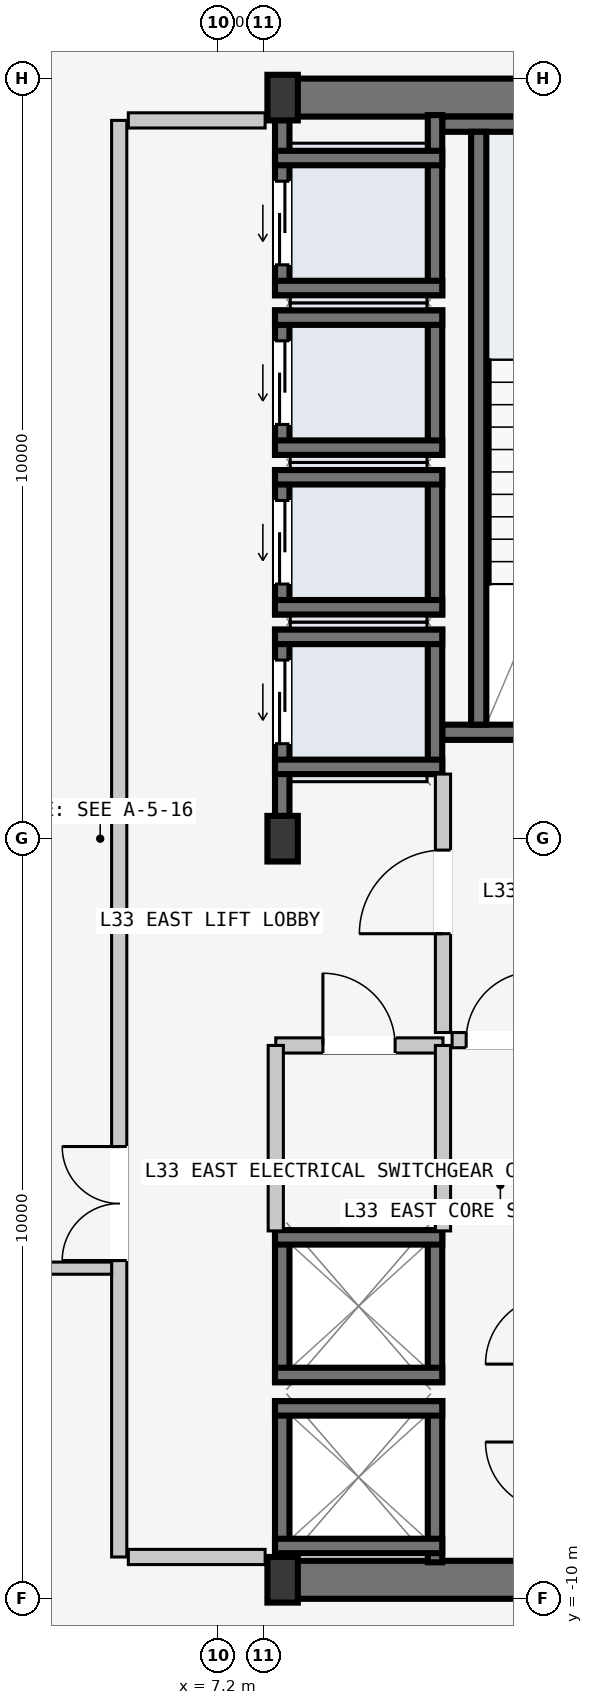
"""IFC4 building model, lengths in metres.
Left out: names, types, materials, properties, quantities, classifications, styles, units other than length and angle.
Written with IfcOpenShell. Run it as: python <this file> out.ifc"""

import sys

from ifc_helpers import new_model, si_unit, direction, frame, frame_2d, origin, origin_2d, place, context, subcontext, project, spatial, rectangle, i_section, extrude, element, fill, save


model = new_model("IFC4")
c1 = context("Model", 3, precision=1e-05, world=origin(), true_north=direction((0.0, 1.0)))
c2 = subcontext(c1, "Body", "Model", "MODEL_VIEW")
j1 = project(units=[si_unit("LENGTHUNIT", "METRE"), si_unit("PLANEANGLEUNIT", "RADIAN")], contexts=[c1])
p1 = place(None, origin())
s1 = spatial("IfcSite", under=j1, at=p1, CompositionType="ELEMENT")
p2 = place(p1, origin())
s2 = spatial("IfcBuilding", under=s1, at=p2, CompositionType="ELEMENT")
p3 = place(p2, frame((0.0, 0.0, 127.8)))
s3 = spatial("IfcBuildingStorey", under=s2, at=p3, CompositionType="ELEMENT", Elevation=127.8)
for number, where, z_axis, x_axis in (
    (1, (8.07, -9.75, -0.2), (0.0, 0.0, 1.0), (1.0, 0.0, 0.0)),
    (2, (8.07, 9.75, -0.2), (0.0, 0.0, 1.0), (1.0, 0.0, 0.0)),
):
    element("IfcWall", number, at=place(p3, frame(where, z_axis=z_axis, x_axis=x_axis)), inside=s3, PredefinedType="SHEAR", context=c2, shape_type="SweptSolid", body=[
        extrude(rectangle(XDim=6.46, YDim=0.5, at=frame_2d((3.23, 0.0))), origin(), (0.0, 0.0, 1.0), 3.6),
    ])
p4 = place(p3, frame((10.15, 1.4, -0.2), z_axis=(0.0, 0.0, 1.0), x_axis=(1.0, 0.0, 0.0)))
e3 = element("IfcWall", 3, at=p4, inside=s3, PredefinedType="SOLIDWALL", context=c2, shape_type="SweptSolid", body=[
    extrude(rectangle(XDim=4.1, YDim=0.2, at=frame_2d((2.05, 0.0))), origin(), (0.0, 0.0, 1.0), 3.6),
])
p5 = place(p4, frame((1.5, 0.0, 0.2)))
e4 = element("IfcOpeningElement", 4, at=p5, cuts=e3, PredefinedType="OPENING", context=c2, shape_type="SweptSolid", body=[
    extrude(rectangle(XDim=1.12, YDim=2.18, at=frame_2d((0.56, 1.09))), frame((0.0, 0.11, 0.0), z_axis=(0.0, -1.0, 0.0), x_axis=(1.0, 0.0, 0.0)), (0.0, 0.0, 1.0), 0.22),
])
p6 = place(p3, frame((10.15, 9.4, -0.2), z_axis=(0.0, 0.0, 1.0), x_axis=(1.0, 0.0, 0.0)))
e5 = element("IfcWall", 5, at=p6, inside=s3, PredefinedType="SOLIDWALL", context=c2, shape_type="SweptSolid", body=[
    extrude(rectangle(XDim=4.1, YDim=0.2, at=frame_2d((2.05, 0.0))), origin(), (0.0, 0.0, 1.0), 3.6),
])
p7 = place(p3, frame((10.63, 1.5, -0.2), z_axis=(0.0, 0.0, 1.0), x_axis=(0.0, 1.0, 0.0)))
e6 = element("IfcWall", 6, at=p7, inside=s3, PredefinedType="SOLIDWALL", context=c2, shape_type="SweptSolid", body=[
    extrude(rectangle(XDim=7.8, YDim=0.2, at=frame_2d((3.9, 0.0))), origin(), (0.0, 0.0, 1.0), 3.6),
])
for number, where, z_axis, x_axis in (
    (7, (8.05, -9.75, 0.0), (0.0, 0.0, 1.0), (1.0, 0.0, 0.0)),
    (8, (8.05, 0.0, 0.0), (0.0, 0.0, 1.0), (1.0, 0.0, 0.0)),
    (9, (8.05, 9.75, 0.0), (0.0, 0.0, 1.0), (1.0, 0.0, 0.0)),
):
    element("IfcColumn", number, at=place(p3, frame(where, z_axis=z_axis, x_axis=x_axis)), inside=s3, PredefinedType="COLUMN", context=c2, shape_type="SweptSolid", body=[
        extrude(i_section(OverallWidth=0.4, OverallDepth=0.6, WebThickness=0.022, FlangeThickness=0.036, at=origin_2d()), origin(), (0.0, 0.0, 1.0), 3.6),
    ])
p8 = place(p3, frame((8.045, 0.21, -0.2), z_axis=(0.0, 0.0, 1.0), x_axis=(0.0, 1.0, 0.0)))
e10 = element("IfcWall", 10, at=p8, inside=s3, PredefinedType="SOLIDWALL", context=c2, shape_type="SweptSolid", body=[
    extrude(rectangle(XDim=2.54, YDim=0.19, at=frame_2d((1.27, 0.0))), origin(), (0.0, 0.0, 1.0), 3.6),
])
p9 = place(p8, frame((1.04, 0.0, 0.2)))
e11 = element("IfcOpeningElement", 11, at=p9, cuts=e10, PredefinedType="OPENING", context=c2, shape_type="SweptSolid", body=[
    extrude(rectangle(XDim=1.1, YDim=2.2, at=frame_2d((0.55, 1.1))), frame((0.0, 0.105, 0.0), z_axis=(0.0, -1.0, 0.0), x_axis=(1.0, 0.0, 0.0)), (0.0, 0.0, 1.0), 0.21),
])
p10 = place(p3, frame((10.055, 0.85, -0.2), z_axis=(0.0, 0.0, 1.0), x_axis=(0.0, 1.0, 0.0)))
e12 = element("IfcWall", 12, at=p10, inside=s3, PredefinedType="SOLIDWALL", context=c2, shape_type="SweptSolid", body=[
    extrude(rectangle(XDim=1.9, YDim=0.19, at=frame_2d((0.95, 0.0))), origin(), (0.0, 0.0, 1.0), 3.6),
])
for number, where, z_axis, x_axis in (
    (13, (7.95, 2.655, -0.2), (0.0, 0.0, 1.0), (1.0, 0.0, 0.0)),
    (14, (7.95, 0.945, -0.2), (0.0, 0.0, 1.0), (1.0, 0.0, 0.0)),
):
    element("IfcWall", number, at=place(p3, frame(where, z_axis=z_axis, x_axis=x_axis)), inside=s3, PredefinedType="SOLIDWALL", context=c2, shape_type="SweptSolid", body=[
        extrude(rectangle(XDim=2.2, YDim=0.19, at=frame_2d((1.1, 0.0))), origin(), (0.0, 0.0, 1.0), 3.6),
    ])
p11 = place(p3, frame((8.045, 2.95, -0.2), z_axis=(0.0, 0.0, 1.0), x_axis=(0.0, 1.0, 0.0)))
e15 = element("IfcWall", 15, at=p11, inside=s3, PredefinedType="SOLIDWALL", context=c2, shape_type="SweptSolid", body=[
    extrude(rectangle(XDim=1.9, YDim=0.19, at=frame_2d((0.95, 0.0))), origin(), (0.0, 0.0, 1.0), 3.6),
])
p12 = place(p11, frame((0.4, 0.0, 0.2)))
e16 = element("IfcOpeningElement", 16, at=p12, cuts=e15, PredefinedType="OPENING", context=c2, shape_type="SweptSolid", body=[
    extrude(rectangle(XDim=1.1, YDim=2.2, at=frame_2d((0.55, 1.1))), frame((0.0, 0.105, 0.0), z_axis=(0.0, -1.0, 0.0), x_axis=(1.0, 0.0, 0.0)), (0.0, 0.0, 1.0), 0.21),
])
p13 = place(p3, frame((10.055, 2.95, -0.2), z_axis=(0.0, 0.0, 1.0), x_axis=(0.0, 1.0, 0.0)))
e17 = element("IfcWall", 17, at=p13, inside=s3, PredefinedType="SOLIDWALL", context=c2, shape_type="SweptSolid", body=[
    extrude(rectangle(XDim=1.9, YDim=0.19, at=frame_2d((0.95, 0.0))), origin(), (0.0, 0.0, 1.0), 3.6),
])
for number, where, z_axis, x_axis in (
    (18, (7.95, 4.755, -0.2), (0.0, 0.0, 1.0), (1.0, 0.0, 0.0)),
    (19, (7.95, 3.045, -0.2), (0.0, 0.0, 1.0), (1.0, 0.0, 0.0)),
):
    element("IfcWall", number, at=place(p3, frame(where, z_axis=z_axis, x_axis=x_axis)), inside=s3, PredefinedType="SOLIDWALL", context=c2, shape_type="SweptSolid", body=[
        extrude(rectangle(XDim=2.2, YDim=0.19, at=frame_2d((1.1, 0.0))), origin(), (0.0, 0.0, 1.0), 3.6),
    ])
p14 = place(p3, frame((8.045, 5.05, -0.2), z_axis=(0.0, 0.0, 1.0), x_axis=(0.0, 1.0, 0.0)))
e20 = element("IfcWall", 20, at=p14, inside=s3, PredefinedType="SOLIDWALL", context=c2, shape_type="SweptSolid", body=[
    extrude(rectangle(XDim=1.9, YDim=0.19, at=frame_2d((0.95, 0.0))), origin(), (0.0, 0.0, 1.0), 3.6),
])
p15 = place(p14, frame((0.4, 0.0, 0.2)))
e21 = element("IfcOpeningElement", 21, at=p15, cuts=e20, PredefinedType="OPENING", context=c2, shape_type="SweptSolid", body=[
    extrude(rectangle(XDim=1.1, YDim=2.2, at=frame_2d((0.55, 1.1))), frame((0.0, 0.105, 0.0), z_axis=(0.0, -1.0, 0.0), x_axis=(1.0, 0.0, 0.0)), (0.0, 0.0, 1.0), 0.21),
])
p16 = place(p3, frame((10.055, 5.05, -0.2), z_axis=(0.0, 0.0, 1.0), x_axis=(0.0, 1.0, 0.0)))
e22 = element("IfcWall", 22, at=p16, inside=s3, PredefinedType="SOLIDWALL", context=c2, shape_type="SweptSolid", body=[
    extrude(rectangle(XDim=1.9, YDim=0.19, at=frame_2d((0.95, 0.0))), origin(), (0.0, 0.0, 1.0), 3.6),
])
for number, where, z_axis, x_axis in (
    (23, (7.95, 6.855, -0.2), (0.0, 0.0, 1.0), (1.0, 0.0, 0.0)),
    (24, (7.95, 5.145, -0.2), (0.0, 0.0, 1.0), (1.0, 0.0, 0.0)),
):
    element("IfcWall", number, at=place(p3, frame(where, z_axis=z_axis, x_axis=x_axis)), inside=s3, PredefinedType="SOLIDWALL", context=c2, shape_type="SweptSolid", body=[
        extrude(rectangle(XDim=2.2, YDim=0.19, at=frame_2d((1.1, 0.0))), origin(), (0.0, 0.0, 1.0), 3.6),
    ])
p17 = place(p3, frame((8.045, 7.15, -0.2), z_axis=(0.0, 0.0, 1.0), x_axis=(0.0, 1.0, 0.0)))
e25 = element("IfcWall", 25, at=p17, inside=s3, PredefinedType="SOLIDWALL", context=c2, shape_type="SweptSolid", body=[
    extrude(rectangle(XDim=2.37, YDim=0.19, at=frame_2d((1.185, 0.0))), origin(), (0.0, 0.0, 1.0), 3.6),
])
p18 = place(p17, frame((0.4, 0.0, 0.2)))
e26 = element("IfcOpeningElement", 26, at=p18, cuts=e25, PredefinedType="OPENING", context=c2, shape_type="SweptSolid", body=[
    extrude(rectangle(XDim=1.1, YDim=2.2, at=frame_2d((0.55, 1.1))), frame((0.0, 0.105, 0.0), z_axis=(0.0, -1.0, 0.0), x_axis=(1.0, 0.0, 0.0)), (0.0, 0.0, 1.0), 0.21),
])
p19 = place(p3, frame((10.055, 7.15, -0.2), z_axis=(0.0, 0.0, 1.0), x_axis=(0.0, 1.0, 0.0)))
e27 = element("IfcWall", 27, at=p19, inside=s3, PredefinedType="SOLIDWALL", context=c2, shape_type="SweptSolid", body=[
    extrude(rectangle(XDim=2.37, YDim=0.19, at=frame_2d((1.185, 0.0))), origin(), (0.0, 0.0, 1.0), 3.6),
])
for number, where, z_axis, x_axis in (
    (28, (7.95, 8.955, -0.2), (0.0, 0.0, 1.0), (1.0, 0.0, 0.0)),
    (29, (7.95, 7.245, -0.2), (0.0, 0.0, 1.0), (1.0, 0.0, 0.0)),
):
    element("IfcWall", number, at=place(p3, frame(where, z_axis=z_axis, x_axis=x_axis)), inside=s3, PredefinedType="SOLIDWALL", context=c2, shape_type="SweptSolid", body=[
        extrude(rectangle(XDim=2.2, YDim=0.19, at=frame_2d((1.1, 0.0))), origin(), (0.0, 0.0, 1.0), 3.6),
    ])
for number, where, z_axis, x_axis in (
    (30, (8.045, -9.52, -0.2), (0.0, 0.0, 1.0), (0.0, 1.0, 0.0)),
    (31, (10.055, -9.52, -0.2), (0.0, 0.0, 1.0), (0.0, 1.0, 0.0)),
):
    element("IfcWall", number, at=place(p3, frame(where, z_axis=z_axis, x_axis=x_axis)), inside=s3, PredefinedType="SOLIDWALL", context=c2, shape_type="SweptSolid", body=[
        extrude(rectangle(XDim=2.12, YDim=0.19, at=frame_2d((1.06, 0.0))), origin(), (0.0, 0.0, 1.0), 3.6),
    ])
for number, where, z_axis, x_axis in (
    (32, (7.95, -7.495, -0.2), (0.0, 0.0, 1.0), (1.0, 0.0, 0.0)),
    (33, (7.95, -9.305, -0.2), (0.0, 0.0, 1.0), (1.0, 0.0, 0.0)),
):
    element("IfcWall", number, at=place(p3, frame(where, z_axis=z_axis, x_axis=x_axis)), inside=s3, PredefinedType="SOLIDWALL", context=c2, shape_type="SweptSolid", body=[
        extrude(rectangle(XDim=2.2, YDim=0.19, at=frame_2d((1.1, 0.0))), origin(), (0.0, 0.0, 1.0), 3.6),
    ])
for number, where, z_axis, x_axis in (
    (34, (8.045, -7.15, -0.2), (0.0, 0.0, 1.0), (0.0, 1.0, 0.0)),
    (35, (10.055, -7.15, -0.2), (0.0, 0.0, 1.0), (0.0, 1.0, 0.0)),
):
    element("IfcWall", number, at=place(p3, frame(where, z_axis=z_axis, x_axis=x_axis)), inside=s3, PredefinedType="SOLIDWALL", context=c2, shape_type="SweptSolid", body=[
        extrude(rectangle(XDim=2.0, YDim=0.19, at=frame_2d((1.0, 0.0))), origin(), (0.0, 0.0, 1.0), 3.6),
    ])
for number, where, z_axis, x_axis in (
    (36, (7.95, -5.245, -0.2), (0.0, 0.0, 1.0), (1.0, 0.0, 0.0)),
    (37, (7.95, -7.055, -0.2), (0.0, 0.0, 1.0), (1.0, 0.0, 0.0)),
):
    element("IfcWall", number, at=place(p3, frame(where, z_axis=z_axis, x_axis=x_axis)), inside=s3, PredefinedType="SOLIDWALL", context=c2, shape_type="SweptSolid", body=[
        extrude(rectangle(XDim=2.2, YDim=0.19, at=frame_2d((1.1, 0.0))), origin(), (0.0, 0.0, 1.0), 3.6),
    ])
p20 = place(p3, frame((5.9, -9.45, 0.0), z_axis=(0.0, 0.0, 1.0), x_axis=(0.0, 1.0, 0.0)))
e38 = element("IfcWall", 38, at=p20, inside=s3, PredefinedType="PARTITIONING", context=c2, shape_type="SweptSolid", body=[
    extrude(rectangle(XDim=18.9, YDim=0.2, at=frame_2d((9.45, 0.0))), origin(), (0.0, 0.0, 1.0), 3.4),
])
p21 = place(p20, frame((3.9, 0.0, 0.0)))
e39 = element("IfcOpeningElement", 39, at=p21, cuts=e38, PredefinedType="OPENING", context=c2, shape_type="SweptSolid", body=[
    extrude(rectangle(XDim=1.5, YDim=2.2, at=frame_2d((0.75, 1.1))), frame((0.0, 0.11, 0.0), z_axis=(0.0, -1.0, 0.0), x_axis=(1.0, 0.0, 0.0)), (0.0, 0.0, 1.0), 0.22),
])
for number, where, z_axis, x_axis in (
    (40, (6.02, -9.45, 0.0), (0.0, 0.0, 1.0), (1.0, 0.0, 0.0)),
    (41, (6.02, 9.45, 0.0), (0.0, 0.0, 1.0), (1.0, 0.0, 0.0)),
):
    element("IfcWall", number, at=place(p3, frame(where, z_axis=z_axis, x_axis=x_axis)), inside=s3, PredefinedType="PARTITIONING", context=c2, shape_type="SweptSolid", body=[
        extrude(rectangle(XDim=1.8, YDim=0.2, at=frame_2d((0.9, 0.0))), origin(), (0.0, 0.0, 1.0), 3.4),
    ])
p22 = place(p3, frame((10.16, -2.55, 0.0), z_axis=(0.0, 0.0, 1.0), x_axis=(0.0, 1.0, 0.0)))
e42 = element("IfcWall", 42, at=p22, inside=s3, PredefinedType="PARTITIONING", context=c2, shape_type="SweptSolid", body=[
    extrude(rectangle(XDim=3.4, YDim=0.2, at=frame_2d((1.7, 0.0))), origin(), (0.0, 0.0, 1.0), 3.4),
])
p23 = place(p22, frame((1.3, 0.0, 0.0)))
e43 = element("IfcOpeningElement", 43, at=p23, cuts=e42, PredefinedType="OPENING", context=c2, shape_type="SweptSolid", body=[
    extrude(rectangle(XDim=1.1, YDim=2.15, at=frame_2d((0.55, 1.075))), frame((0.0, 0.11, 0.0), z_axis=(0.0, -1.0, 0.0), x_axis=(1.0, 0.0, 0.0)), (0.0, 0.0, 1.0), 0.22),
])
p24 = place(p3, frame((10.28, -2.65, 0.0), z_axis=(0.0, 0.0, 1.0), x_axis=(1.0, 0.0, 0.0)))
e44 = element("IfcWall", 44, at=p24, inside=s3, PredefinedType="PARTITIONING", context=c2, shape_type="SweptSolid", body=[
    extrude(rectangle(XDim=1.27, YDim=0.2, at=frame_2d((0.635, 0.0))), origin(), (0.0, 0.0, 1.0), 3.4),
])
p25 = place(p24, frame((0.185, 0.0, 0.0)))
e45 = element("IfcOpeningElement", 45, at=p25, cuts=e44, PredefinedType="OPENING", context=c2, shape_type="SweptSolid", body=[
    extrude(rectangle(XDim=0.9, YDim=2.15, at=frame_2d((0.45, 1.075))), frame((0.0, 0.11, 0.0), z_axis=(0.0, -1.0, 0.0), x_axis=(1.0, 0.0, 0.0)), (0.0, 0.0, 1.0), 0.22),
])
p26 = place(p3, frame((7.96, -2.72, 0.0), z_axis=(0.0, 0.0, 1.0), x_axis=(1.0, 0.0, 0.0)))
e46 = element("IfcWall", 46, at=p26, inside=s3, PredefinedType="PARTITIONING", context=c2, shape_type="SweptSolid", body=[
    extrude(rectangle(XDim=2.2, YDim=0.2, at=frame_2d((1.1, 0.0))), origin(), (0.0, 0.0, 1.0), 3.4),
])
p27 = place(p26, frame((0.62, 0.0, 0.0)))
e47 = element("IfcOpeningElement", 47, at=p27, cuts=e46, PredefinedType="OPENING", context=c2, shape_type="SweptSolid", body=[
    extrude(rectangle(XDim=0.95, YDim=2.1, at=frame_2d((0.475, 1.05))), frame((0.0, 0.11, 0.0), z_axis=(0.0, -1.0, 0.0), x_axis=(1.0, 0.0, 0.0)), (0.0, 0.0, 1.0), 0.22),
])
for number, where, z_axis, x_axis in (
    (48, (7.96, -5.16, 0.0), (0.0, 0.0, 1.0), (0.0, 1.0, 0.0)),
    (49, (10.16, -5.16, 0.0), (0.0, 0.0, 1.0), (0.0, 1.0, 0.0)),
):
    element("IfcWall", number, at=place(p3, frame(where, z_axis=z_axis, x_axis=x_axis)), inside=s3, PredefinedType="PARTITIONING", context=c2, shape_type="SweptSolid", body=[
        extrude(rectangle(XDim=2.44, YDim=0.2, at=frame_2d((1.22, 0.0))), origin(), (0.0, 0.0, 1.0), 3.4),
    ])
p28 = place(p3, frame((-5.8, -5.65, 0.0), z_axis=(0.0, 0.0, 1.0), x_axis=(1.0, 0.0, 0.0)))
e50 = element("IfcWall", 50, at=p28, inside=s3, PredefinedType="PARTITIONING", context=c2, shape_type="SweptSolid", body=[
    extrude(rectangle(XDim=11.6, YDim=0.16, at=frame_2d((5.8, 0.0))), origin(), (0.0, 0.0, 1.0), 3.4),
])
p29 = place(p28, frame((5.1, 0.0, 0.0)))
e51 = element("IfcOpeningElement", 51, at=p29, cuts=e50, PredefinedType="OPENING", context=c2, shape_type="SweptSolid", body=[
    extrude(rectangle(XDim=1.4, YDim=2.2, at=frame_2d((0.7, 1.1))), frame((0.0, 0.09, 0.0), z_axis=(0.0, -1.0, 0.0), x_axis=(1.0, 0.0, 0.0)), (0.0, 0.0, 1.0), 0.18),
])
p30 = place(p9, origin())
e52 = element("IfcDoor", 52, at=p30, inside=s3, OperationType="SLIDING_TO_LEFT", PredefinedType="DOOR", context=c2, shape_type="SweptSolid", body=[
    extrude(rectangle(XDim=1.1, YDim=2.2, at=frame_2d((0.55, 1.1))), frame((0.0, 0.025, 0.0), z_axis=(0.0, -1.0, 0.0), x_axis=(1.0, 0.0, 0.0)), (0.0, 0.0, 1.0), 0.05),
])
fill(e11, e52)
p31 = place(p12, origin())
e53 = element("IfcDoor", 53, at=p31, inside=s3, OperationType="SLIDING_TO_LEFT", PredefinedType="DOOR", context=c2, shape_type="SweptSolid", body=[
    extrude(rectangle(XDim=1.1, YDim=2.2, at=frame_2d((0.55, 1.1))), frame((0.0, 0.025, 0.0), z_axis=(0.0, -1.0, 0.0), x_axis=(1.0, 0.0, 0.0)), (0.0, 0.0, 1.0), 0.05),
])
fill(e16, e53)
p32 = place(p15, origin())
e54 = element("IfcDoor", 54, at=p32, inside=s3, OperationType="SLIDING_TO_LEFT", PredefinedType="DOOR", context=c2, shape_type="SweptSolid", body=[
    extrude(rectangle(XDim=1.1, YDim=2.2, at=frame_2d((0.55, 1.1))), frame((0.0, 0.025, 0.0), z_axis=(0.0, -1.0, 0.0), x_axis=(1.0, 0.0, 0.0)), (0.0, 0.0, 1.0), 0.05),
])
fill(e21, e54)
p33 = place(p18, origin())
e55 = element("IfcDoor", 55, at=p33, inside=s3, OperationType="SLIDING_TO_LEFT", PredefinedType="DOOR", context=c2, shape_type="SweptSolid", body=[
    extrude(rectangle(XDim=1.1, YDim=2.2, at=frame_2d((0.55, 1.1))), frame((0.0, 0.025, 0.0), z_axis=(0.0, -1.0, 0.0), x_axis=(1.0, 0.0, 0.0)), (0.0, 0.0, 1.0), 0.05),
])
fill(e26, e55)
p34 = place(p21, origin())
e56 = element("IfcDoor", 56, at=p34, inside=s3, OperationType="DOUBLE_DOOR_SINGLE_SWING", PredefinedType="DOOR", context=c2, shape_type="SweptSolid", body=[
    extrude(rectangle(XDim=1.5, YDim=2.2, at=frame_2d((0.75, 1.1))), frame((0.0, 0.025, 0.0), z_axis=(0.0, -1.0, 0.0), x_axis=(1.0, 0.0, 0.0)), (0.0, 0.0, 1.0), 0.05),
])
fill(e39, e56)
p35 = place(p23, origin())
e57 = element("IfcDoor", 57, at=p35, inside=s3, OperationType="SINGLE_SWING_LEFT", PredefinedType="DOOR", context=c2, shape_type="SweptSolid", body=[
    extrude(rectangle(XDim=1.1, YDim=2.15, at=frame_2d((0.55, 1.075))), frame((0.0, 0.025, 0.0), z_axis=(0.0, -1.0, 0.0), x_axis=(1.0, 0.0, 0.0)), (0.0, 0.0, 1.0), 0.05),
])
fill(e43, e57)
p36 = place(p25, origin())
e58 = element("IfcDoor", 58, at=p36, inside=s3, OperationType="SINGLE_SWING_RIGHT", PredefinedType="DOOR", context=c2, shape_type="SweptSolid", body=[
    extrude(rectangle(XDim=0.9, YDim=2.15, at=frame_2d((0.45, 1.075))), frame((0.0, 0.025, 0.0), z_axis=(0.0, -1.0, 0.0), x_axis=(1.0, 0.0, 0.0)), (0.0, 0.0, 1.0), 0.05),
])
fill(e45, e58)
p37 = place(p27, origin())
e59 = element("IfcDoor", 59, at=p37, inside=s3, OperationType="SINGLE_SWING_LEFT", PredefinedType="DOOR", context=c2, shape_type="SweptSolid", body=[
    extrude(rectangle(XDim=0.95, YDim=2.1, at=frame_2d((0.475, 1.05))), frame((0.0, 0.025, 0.0), z_axis=(0.0, -1.0, 0.0), x_axis=(1.0, 0.0, 0.0)), (0.0, 0.0, 1.0), 0.05),
])
fill(e47, e59)
save(model, sys.argv[1])
